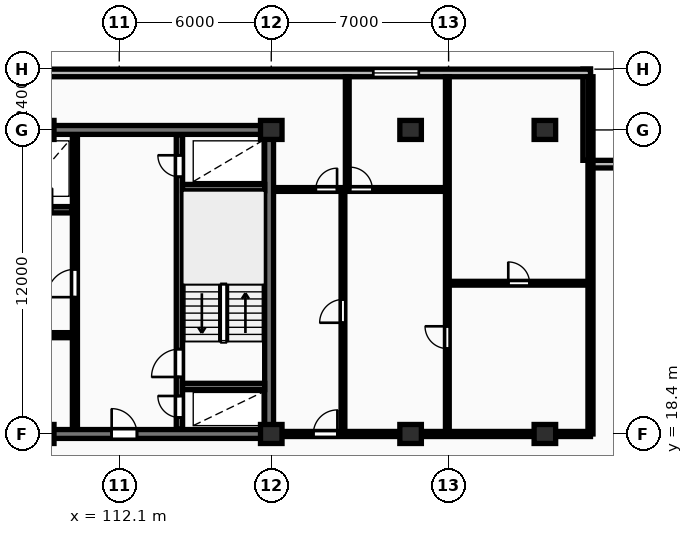
"""IFC4 building model, lengths in metres.
Left out: names, types, materials, properties, quantities, classifications, styles, units other than length and angle.
Written with IfcOpenShell. Run it as: python <this file> out.ifc"""

import sys

from ifc_helpers import new_model, si_unit, direction, frame, frame_2d, origin, origin_2d, place, context, subcontext, project, spatial, rectangle, extrude, element, fill, save


model = new_model("IFC4")
c1 = context("Model", 3, precision=1e-05, world=origin(), true_north=direction((0.0, 1.0)))
c2 = subcontext(c1, "Body", "Model", "MODEL_VIEW")
j1 = project(units=[si_unit("LENGTHUNIT", "METRE"), si_unit("PLANEANGLEUNIT", "RADIAN")], contexts=[c1])
p1 = place(None, origin())
s1 = spatial("IfcSite", under=j1, at=p1, CompositionType="ELEMENT")
p2 = place(p1, origin())
s2 = spatial("IfcBuilding", under=s1, at=p2, CompositionType="ELEMENT")
p3 = place(p2, frame((0.0, 0.0, 87.3)))
s3 = spatial("IfcBuildingStorey", under=s2, at=p3, CompositionType="ELEMENT", Elevation=87.3)
for number, where, z_axis, x_axis in (
    (1, (109.1, 18.4, 0.0), (0.0, 0.0, 1.0), (1.0, 0.0, 0.0)),
    (2, (109.1, 30.4, 0.0), (0.0, 0.0, 1.0), (1.0, 0.0, 0.0)),
    (3, (118.1, 18.4, 0.0), (0.0, 0.0, 1.0), (1.0, 0.0, 0.0)),
    (4, (118.1, 30.4, 0.0), (0.0, 0.0, 1.0), (1.0, 0.0, 0.0)),
    (5, (123.6, 18.4, 0.0), (0.0, 0.0, 1.0), (1.0, 0.0, 0.0)),
    (6, (123.6, 30.4, 0.0), (0.0, 0.0, 1.0), (1.0, 0.0, 0.0)),
    (7, (128.9, 18.4, 0.0), (0.0, 0.0, 1.0), (1.0, 0.0, 0.0)),
    (8, (128.9, 30.4, 0.0), (0.0, 0.0, 1.0), (1.0, 0.0, 0.0)),
):
    element("IfcColumn", number, at=place(p3, frame(where, z_axis=z_axis, x_axis=x_axis)), inside=s3, PredefinedType="COLUMN", context=c2, shape_type="SweptSolid", body=[
        extrude(rectangle(XDim=0.85, YDim=0.75, at=origin_2d()), origin(), (0.0, 0.0, 1.0), 3.25),
    ])
for number, where, z_axis, x_axis in (
    (9, (134.3, 29.05, 0.0), (0.0, 0.0, 1.0), (-1.0, 0.0, 0.0)),
    (10, (130.55, 29.2, 0.0), (0.0, 0.0, 1.0), (0.0, 1.0, 0.0)),
):
    element("IfcWall", number, at=place(p3, frame(where, z_axis=z_axis, x_axis=x_axis)), inside=s3, PredefinedType="STANDARD", context=c2, shape_type="SweptSolid", body=[
        extrude(rectangle(XDim=3.6, YDim=0.3, at=frame_2d((1.8, 0.0))), origin(), (0.0, 0.0, 1.0), 2.97),
    ])
p4 = place(p3, frame((130.7, 32.65, 0.0), z_axis=(0.0, 0.0, 1.0), x_axis=(-1.0, 0.0, 0.0)))
e11 = element("IfcWall", 11, at=p4, inside=s3, PredefinedType="STANDARD", context=c2, shape_type="SweptSolid", body=[
    extrude(rectangle(XDim=58.0, YDim=0.3, at=frame_2d((29.0, 0.0))), origin(), (0.0, 0.0, 1.0), 2.97),
])
p5 = place(p4, frame((50.125, 0.0, 0.85)))
e12 = element("IfcOpeningElement", 12, at=p5, cuts=e11, PredefinedType="OPENING", context=c2, shape_type="SweptSolid", body=[
    extrude(rectangle(XDim=1.8, YDim=1.8, at=frame_2d((0.9, 0.9))), frame((0.0, 0.16, 0.0), z_axis=(0.0, -1.0, 0.0), x_axis=(1.0, 0.0, 0.0)), (0.0, 0.0, 1.0), 0.32),
])
p6 = place(p4, frame((6.775, 0.0, 0.85)))
e13 = element("IfcOpeningElement", 13, at=p6, cuts=e11, PredefinedType="OPENING", context=c2, shape_type="SweptSolid", body=[
    extrude(rectangle(XDim=1.8, YDim=1.8, at=frame_2d((0.9, 0.9))), frame((0.0, 0.16, 0.0), z_axis=(0.0, -1.0, 0.0), x_axis=(1.0, 0.0, 0.0)), (0.0, 0.0, 1.0), 0.32),
])
p7 = place(p3, frame((81.925, 30.4, 0.0), z_axis=(0.0, 0.0, 1.0), x_axis=(1.0, 0.0, 0.0)))
e14 = element("IfcWall", 14, at=p7, inside=s3, PredefinedType="SHEAR", context=c2, shape_type="SweptSolid", body=[
    extrude(rectangle(XDim=36.265, YDim=0.35, at=frame_2d((18.132, 0.0))), origin(), (0.0, 0.0, 1.0), 3.25),
])
p8 = place(p3, frame((118.015, 18.575, 0.0), z_axis=(0.0, 0.0, 1.0), x_axis=(0.0, 1.0, 0.0)))
e15 = element("IfcWall", 15, at=p8, inside=s3, PredefinedType="SHEAR", context=c2, shape_type="SweptSolid", body=[
    extrude(rectangle(XDim=11.65, YDim=0.35, at=frame_2d((5.825, 0.0))), origin(), (0.0, 0.0, 1.0), 3.25),
])
p9 = place(p3, frame((81.925, 18.4, 0.0), z_axis=(0.0, 0.0, 1.0), x_axis=(1.0, 0.0, 0.0)))
e16 = element("IfcWall", 16, at=p9, inside=s3, PredefinedType="SHEAR", context=c2, shape_type="SweptSolid", body=[
    extrude(rectangle(XDim=36.265, YDim=0.35, at=frame_2d((18.132, 0.0))), origin(), (0.0, 0.0, 1.0), 3.25),
])
p10 = place(p9, frame((5.675, 0.0, 0.0)))
e17 = element("IfcOpeningElement", 17, at=p10, cuts=e16, PredefinedType="OPENING", context=c2, shape_type="SweptSolid", body=[
    extrude(rectangle(XDim=1.0, YDim=2.15, at=frame_2d((0.5, 1.075))), frame((0.0, 0.185, 0.0), z_axis=(0.0, -1.0, 0.0), x_axis=(1.0, 0.0, 0.0)), (0.0, 0.0, 1.0), 0.37),
])
p11 = place(p9, frame((21.925, 0.0, 0.0)))
e18 = element("IfcOpeningElement", 18, at=p11, cuts=e16, PredefinedType="OPENING", context=c2, shape_type="SweptSolid", body=[
    extrude(rectangle(XDim=1.5, YDim=2.2, at=frame_2d((0.75, 1.1))), frame((0.0, 0.185, 0.0), z_axis=(0.0, -1.0, 0.0), x_axis=(1.0, 0.0, 0.0)), (0.0, 0.0, 1.0), 0.37),
])
p12 = place(p9, frame((29.875, 0.0, 0.0)))
e19 = element("IfcOpeningElement", 19, at=p12, cuts=e16, PredefinedType="OPENING", context=c2, shape_type="SweptSolid", body=[
    extrude(rectangle(XDim=1.0, YDim=2.15, at=frame_2d((0.5, 1.075))), frame((0.0, 0.185, 0.0), z_axis=(0.0, -1.0, 0.0), x_axis=(1.0, 0.0, 0.0)), (0.0, 0.0, 1.0), 0.37),
])
p13 = place(p3, frame((99.68, 27.25, 0.0), z_axis=(0.0, 0.0, 1.0), x_axis=(1.0, 0.0, 0.0)))
e20 = element("IfcWall", 20, at=p13, inside=s3, PredefinedType="SHEAR", context=c2, shape_type="SweptSolid", body=[
    extrude(rectangle(XDim=10.54, YDim=0.25, at=frame_2d((5.27, 0.0))), origin(), (0.0, 0.0, 1.0), 3.25),
])
p14 = place(p13, frame((8.92, 0.0, 0.0)))
e21 = element("IfcOpeningElement", 21, at=p14, cuts=e20, PredefinedType="OPENING", context=c2, shape_type="SweptSolid", body=[
    extrude(rectangle(XDim=0.85, YDim=2.05, at=frame_2d((0.425, 1.025))), frame((0.0, 0.135, 0.0), z_axis=(0.0, -1.0, 0.0), x_axis=(1.0, 0.0, 0.0)), (0.0, 0.0, 1.0), 0.27),
])
p15 = place(p3, frame((91.08, 22.3, 0.0), z_axis=(0.0, 0.0, 1.0), x_axis=(1.0, 0.0, 0.0)))
e22 = element("IfcWall", 22, at=p15, inside=s3, PredefinedType="PARTITIONING", context=c2, shape_type="SweptSolid", body=[
    extrude(rectangle(XDim=19.14, YDim=0.2, at=frame_2d((9.57, 0.0))), origin(), (0.0, 0.0, 1.0), 2.97),
])
p16 = place(p15, frame((1.15, 0.0, 0.0)))
e23 = element("IfcOpeningElement", 23, at=p16, cuts=e22, PredefinedType="OPENING", context=c2, shape_type="SweptSolid", body=[
    extrude(rectangle(XDim=0.85, YDim=2.05, at=frame_2d((0.425, 1.025))), frame((0.0, 0.11, 0.0), z_axis=(0.0, -1.0, 0.0), x_axis=(1.0, 0.0, 0.0)), (0.0, 0.0, 1.0), 0.22),
])
p17 = place(p15, frame((3.2, 0.0, 0.0)))
e24 = element("IfcOpeningElement", 24, at=p17, cuts=e22, PredefinedType="OPENING", context=c2, shape_type="SweptSolid", body=[
    extrude(rectangle(XDim=0.85, YDim=2.05, at=frame_2d((0.425, 1.025))), frame((0.0, 0.11, 0.0), z_axis=(0.0, -1.0, 0.0), x_axis=(1.0, 0.0, 0.0)), (0.0, 0.0, 1.0), 0.22),
])
p18 = place(p15, frame((12.72, 0.0, 0.0)))
e25 = element("IfcOpeningElement", 25, at=p18, cuts=e22, PredefinedType="OPENING", context=c2, shape_type="SweptSolid", body=[
    extrude(rectangle(XDim=1.5, YDim=2.2, at=frame_2d((0.75, 1.1))), frame((0.0, 0.11, 0.0), z_axis=(0.0, -1.0, 0.0), x_axis=(1.0, 0.0, 0.0)), (0.0, 0.0, 1.0), 0.22),
])
p19 = place(p15, frame((5.52, 0.0, 0.0)))
e26 = element("IfcOpeningElement", 26, at=p19, cuts=e22, PredefinedType="OPENING", context=c2, shape_type="SweptSolid", body=[
    extrude(rectangle(XDim=0.88, YDim=2.06, at=frame_2d((0.44, 1.03))), frame((0.0, 0.11, 0.0), z_axis=(0.0, -1.0, 0.0), x_axis=(1.0, 0.0, 0.0)), (0.0, 0.0, 1.0), 0.22),
])
p20 = place(p15, frame((7.67, 0.0, 0.0)))
e27 = element("IfcOpeningElement", 27, at=p20, cuts=e22, PredefinedType="OPENING", context=c2, shape_type="SweptSolid", body=[
    extrude(rectangle(XDim=0.88, YDim=2.06, at=frame_2d((0.44, 1.03))), frame((0.0, 0.11, 0.0), z_axis=(0.0, -1.0, 0.0), x_axis=(1.0, 0.0, 0.0)), (0.0, 0.0, 1.0), 0.22),
])
p21 = place(p15, frame((10.27, 0.0, 0.0)))
e28 = element("IfcOpeningElement", 28, at=p21, cuts=e22, PredefinedType="OPENING", context=c2, shape_type="SweptSolid", body=[
    extrude(rectangle(XDim=0.85, YDim=2.05, at=frame_2d((0.425, 1.025))), frame((0.0, 0.11, 0.0), z_axis=(0.0, -1.0, 0.0), x_axis=(1.0, 0.0, 0.0)), (0.0, 0.0, 1.0), 0.22),
])
p22 = place(p15, frame((15.92, 0.0, 0.0)))
e29 = element("IfcOpeningElement", 29, at=p22, cuts=e22, PredefinedType="OPENING", context=c2, shape_type="SweptSolid", body=[
    extrude(rectangle(XDim=0.96, YDim=2.1, at=frame_2d((0.48, 1.05))), frame((0.0, 0.11, 0.0), z_axis=(0.0, -1.0, 0.0), x_axis=(1.0, 0.0, 0.0)), (0.0, 0.0, 1.0), 0.22),
])
p23 = place(p3, frame((110.35, 18.6, 0.0), z_axis=(0.0, 0.0, 1.0), x_axis=(0.0, 1.0, 0.0)))
e30 = element("IfcWall", 30, at=p23, inside=s3, PredefinedType="PARTITIONING", context=c2, shape_type="SweptSolid", body=[
    extrude(rectangle(XDim=11.6, YDim=0.2, at=frame_2d((5.8, 0.0))), origin(), (0.0, 0.0, 1.0), 2.97),
])
p24 = place(p23, frame((5.2, 0.0, 0.0)))
e31 = element("IfcOpeningElement", 31, at=p24, cuts=e30, PredefinedType="OPENING", context=c2, shape_type="SweptSolid", body=[
    extrude(rectangle(XDim=1.1, YDim=2.15, at=frame_2d((0.55, 1.075))), frame((0.0, 0.11, 0.0), z_axis=(0.0, -1.0, 0.0), x_axis=(1.0, 0.0, 0.0)), (0.0, 0.0, 1.0), 0.22),
])
p25 = place(p3, frame((114.475, 18.6, 0.0), z_axis=(0.0, 0.0, 1.0), x_axis=(0.0, 1.0, 0.0)))
e32 = element("IfcWall", 32, at=p25, inside=s3, PredefinedType="SHEAR", context=c2, shape_type="SweptSolid", body=[
    extrude(rectangle(XDim=11.6, YDim=0.25, at=frame_2d((5.8, 0.0))), origin(), (0.0, 0.0, 1.0), 3.25),
])
p26 = place(p25, frame((0.45, 0.0, 0.0)))
e33 = element("IfcOpeningElement", 33, at=p26, cuts=e32, PredefinedType="OPENING", context=c2, shape_type="SweptSolid", body=[
    extrude(rectangle(XDim=0.85, YDim=2.05, at=frame_2d((0.425, 1.025))), frame((0.0, 0.135, 0.0), z_axis=(0.0, -1.0, 0.0), x_axis=(1.0, 0.0, 0.0)), (0.0, 0.0, 1.0), 0.27),
])
p27 = place(p25, frame((2.05, 0.0, 0.0)))
e34 = element("IfcOpeningElement", 34, at=p27, cuts=e32, PredefinedType="OPENING", context=c2, shape_type="SweptSolid", body=[
    extrude(rectangle(XDim=1.1, YDim=2.1, at=frame_2d((0.55, 1.05))), frame((0.0, 0.135, 0.0), z_axis=(0.0, -1.0, 0.0), x_axis=(1.0, 0.0, 0.0)), (0.0, 0.0, 1.0), 0.27),
])
p28 = place(p25, frame((9.95, 0.0, 0.0)))
e35 = element("IfcOpeningElement", 35, at=p28, cuts=e32, PredefinedType="OPENING", context=c2, shape_type="SweptSolid", body=[
    extrude(rectangle(XDim=0.85, YDim=2.05, at=frame_2d((0.425, 1.025))), frame((0.0, 0.135, 0.0), z_axis=(0.0, -1.0, 0.0), x_axis=(1.0, 0.0, 0.0)), (0.0, 0.0, 1.0), 0.27),
])
for number, where, z_axis, x_axis in (
    (36, (114.6, 20.275, 0.0), (0.0, 0.0, 1.0), (1.0, 0.0, 0.0)),
    (37, (114.6, 28.125, 0.0), (0.0, 0.0, 1.0), (1.0, 0.0, 0.0)),
):
    element("IfcWall", number, at=place(p3, frame(where, z_axis=z_axis, x_axis=x_axis)), inside=s3, PredefinedType="SHEAR", context=c2, shape_type="SweptSolid", body=[
        extrude(rectangle(XDim=3.24, YDim=0.25, at=frame_2d((1.62, 0.0))), origin(), (0.0, 0.0, 1.0), 3.25),
    ])
p29 = place(p3, frame((130.7, 18.4, 0.0), z_axis=(0.0, 0.0, 1.0), x_axis=(0.0, 1.0, 0.0)))
e38 = element("IfcWall", 38, at=p29, inside=s3, PredefinedType="PARTITIONING", context=c2, shape_type="SweptSolid", body=[
    extrude(rectangle(XDim=14.1, YDim=0.2, at=frame_2d((7.05, 0.0))), origin(), (0.0, 0.0, 1.0), 2.97),
])
p30 = place(p3, frame((125.05, 24.35, 0.0), z_axis=(0.0, 0.0, 1.0), x_axis=(1.0, 0.0, 0.0)))
e39 = element("IfcWall", 39, at=p30, inside=s3, PredefinedType="PARTITIONING", context=c2, shape_type="SweptSolid", body=[
    extrude(rectangle(XDim=5.65, YDim=0.15, at=frame_2d((2.825, 0.0))), origin(), (0.0, 0.0, 1.0), 2.97),
])
p31 = place(p30, frame((2.405, 0.0, 0.0)))
e40 = element("IfcOpeningElement", 40, at=p31, cuts=e39, PredefinedType="OPENING", context=c2, shape_type="SweptSolid", body=[
    extrude(rectangle(XDim=0.84, YDim=2.04, at=frame_2d((0.42, 1.02))), frame((0.0, 0.085, 0.0), z_axis=(0.0, -1.0, 0.0), x_axis=(1.0, 0.0, 0.0)), (0.0, 0.0, 1.0), 0.17),
])
p32 = place(p3, frame((125.05, 18.45, 0.0), z_axis=(0.0, 0.0, 1.0), x_axis=(0.0, 1.0, 0.0)))
e41 = element("IfcWall", 41, at=p32, inside=s3, PredefinedType="PARTITIONING", context=c2, shape_type="SweptSolid", body=[
    extrude(rectangle(XDim=14.05, YDim=0.15, at=frame_2d((7.025, 0.0))), origin(), (0.0, 0.0, 1.0), 2.97),
])
p33 = place(p32, frame((3.32, 0.0, 0.0)))
e42 = element("IfcOpeningElement", 42, at=p33, cuts=e41, PredefinedType="OPENING", context=c2, shape_type="SweptSolid", body=[
    extrude(rectangle(XDim=0.88, YDim=2.06, at=frame_2d((0.44, 1.03))), frame((0.0, 0.085, 0.0), z_axis=(0.0, -1.0, 0.0), x_axis=(1.0, 0.0, 0.0)), (0.0, 0.0, 1.0), 0.17),
])
p34 = place(p3, frame((120.93, 18.45, 0.0), z_axis=(0.0, 0.0, 1.0), x_axis=(0.0, 1.0, 0.0)))
e43 = element("IfcWall", 43, at=p34, inside=s3, PredefinedType="PARTITIONING", context=c2, shape_type="SweptSolid", body=[
    extrude(rectangle(XDim=9.6, YDim=0.15, at=frame_2d((4.8, 0.0))), origin(), (0.0, 0.0, 1.0), 2.97),
])
p35 = place(p34, frame((4.34, 0.0, 0.0)))
e44 = element("IfcOpeningElement", 44, at=p35, cuts=e43, PredefinedType="OPENING", context=c2, shape_type="SweptSolid", body=[
    extrude(rectangle(XDim=0.92, YDim=2.08, at=frame_2d((0.46, 1.04))), frame((0.0, 0.085, 0.0), z_axis=(0.0, -1.0, 0.0), x_axis=(1.0, 0.0, 0.0)), (0.0, 0.0, 1.0), 0.17),
])
p36 = place(p3, frame((121.1, 28.05, 0.0), z_axis=(0.0, 0.0, 1.0), x_axis=(0.0, 1.0, 0.0)))
e45 = element("IfcWall", 45, at=p36, inside=s3, PredefinedType="PARTITIONING", context=c2, shape_type="SweptSolid", body=[
    extrude(rectangle(XDim=4.45, YDim=0.15, at=frame_2d((2.225, 0.0))), origin(), (0.0, 0.0, 1.0), 2.97),
])
p37 = place(p3, frame((118.27, 28.05, 0.0), z_axis=(0.0, 0.0, 1.0), x_axis=(1.0, 0.0, 0.0)))
e46 = element("IfcWall", 46, at=p37, inside=s3, PredefinedType="PARTITIONING", context=c2, shape_type="SweptSolid", body=[
    extrude(rectangle(XDim=6.76, YDim=0.15, at=frame_2d((3.38, 0.0))), origin(), (0.0, 0.0, 1.0), 2.97),
])
p38 = place(p37, frame((1.587, 0.0, 0.0)))
e47 = element("IfcOpeningElement", 47, at=p38, cuts=e46, PredefinedType="OPENING", context=c2, shape_type="SweptSolid", body=[
    extrude(rectangle(XDim=0.84, YDim=2.04, at=frame_2d((0.42, 1.02))), frame((0.0, 0.085, 0.0), z_axis=(0.0, -1.0, 0.0), x_axis=(1.0, 0.0, 0.0)), (0.0, 0.0, 1.0), 0.17),
])
p39 = place(p37, frame((2.94, 0.0, 0.0)))
e48 = element("IfcOpeningElement", 48, at=p39, cuts=e46, PredefinedType="OPENING", context=c2, shape_type="SweptSolid", body=[
    extrude(rectangle(XDim=0.88, YDim=2.06, at=frame_2d((0.44, 1.03))), frame((0.0, 0.085, 0.0), z_axis=(0.0, -1.0, 0.0), x_axis=(1.0, 0.0, 0.0)), (0.0, 0.0, 1.0), 0.17),
])
p40 = place(p3, frame((118.25, 18.4, 0.0), z_axis=(0.0, 0.0, 1.0), x_axis=(1.0, 0.0, 0.0)))
e49 = element("IfcWall", 49, at=p40, inside=s3, PredefinedType="PARTITIONING", context=c2, shape_type="SweptSolid", body=[
    extrude(rectangle(XDim=12.45, YDim=0.2, at=frame_2d((6.225, 0.0))), origin(), (0.0, 0.0, 1.0), 2.358),
])
p41 = place(p40, frame((1.51, 0.0, 0.0)))
e50 = element("IfcOpeningElement", 50, at=p41, cuts=e49, PredefinedType="OPENING", context=c2, shape_type="SweptSolid", body=[
    extrude(rectangle(XDim=0.95, YDim=2.15, at=frame_2d((0.475, 1.075))), frame((0.0, 0.11, 0.0), z_axis=(0.0, -1.0, 0.0), x_axis=(1.0, 0.0, 0.0)), (0.0, 0.0, 1.0), 0.22),
])
p42 = place(p6, origin())
e51 = element("IfcWindow", 51, at=p42, inside=s3, PartitioningType="SINGLE_PANEL", PredefinedType="WINDOW", context=c2, shape_type="SweptSolid", body=[
    extrude(rectangle(XDim=1.8, YDim=1.8, at=frame_2d((0.9, 0.9))), frame((0.0, 0.03, 0.0), z_axis=(0.0, -1.0, 0.0), x_axis=(1.0, 0.0, 0.0)), (0.0, 0.0, 1.0), 0.06),
])
fill(e13, e51)
p43 = place(p12, origin())
e52 = element("IfcDoor", 52, at=p43, inside=s3, OperationType="SINGLE_SWING_LEFT", PredefinedType="DOOR", context=c2, shape_type="SweptSolid", body=[
    extrude(rectangle(XDim=1.0, YDim=2.15, at=frame_2d((0.5, 1.075))), frame((0.0, 0.025, 0.0), z_axis=(0.0, -1.0, 0.0), x_axis=(1.0, 0.0, 0.0)), (0.0, 0.0, 1.0), 0.05),
])
fill(e19, e52)
p44 = place(p24, origin())
e53 = element("IfcDoor", 53, at=p44, inside=s3, OperationType="SINGLE_SWING_LEFT", PredefinedType="DOOR", context=c2, shape_type="SweptSolid", body=[
    extrude(rectangle(XDim=1.1, YDim=2.15, at=frame_2d((0.55, 1.075))), frame((0.0, 0.025, 0.0), z_axis=(0.0, -1.0, 0.0), x_axis=(1.0, 0.0, 0.0)), (0.0, 0.0, 1.0), 0.05),
])
fill(e31, e53)
p45 = place(p26, origin())
e54 = element("IfcDoor", 54, at=p45, inside=s3, OperationType="SINGLE_SWING_RIGHT", PredefinedType="DOOR", context=c2, shape_type="SweptSolid", body=[
    extrude(rectangle(XDim=0.85, YDim=2.05, at=frame_2d((0.425, 1.025))), frame((0.0, 0.025, 0.0), z_axis=(0.0, -1.0, 0.0), x_axis=(1.0, 0.0, 0.0)), (0.0, 0.0, 1.0), 0.05),
])
fill(e33, e54)
p46 = place(p27, origin())
e55 = element("IfcDoor", 55, at=p46, inside=s3, OperationType="SINGLE_SWING_LEFT", PredefinedType="DOOR", context=c2, shape_type="SweptSolid", body=[
    extrude(rectangle(XDim=1.1, YDim=2.1, at=frame_2d((0.55, 1.05))), frame((0.0, 0.025, 0.0), z_axis=(0.0, -1.0, 0.0), x_axis=(1.0, 0.0, 0.0)), (0.0, 0.0, 1.0), 0.05),
])
fill(e34, e55)
p47 = place(p28, origin())
e56 = element("IfcDoor", 56, at=p47, inside=s3, OperationType="SINGLE_SWING_RIGHT", PredefinedType="DOOR", context=c2, shape_type="SweptSolid", body=[
    extrude(rectangle(XDim=0.85, YDim=2.05, at=frame_2d((0.425, 1.025))), frame((0.0, 0.025, 0.0), z_axis=(0.0, -1.0, 0.0), x_axis=(1.0, 0.0, 0.0)), (0.0, 0.0, 1.0), 0.05),
])
fill(e35, e56)
p48 = place(p31, origin())
e57 = element("IfcDoor", 57, at=p48, inside=s3, OperationType="SINGLE_SWING_LEFT", PredefinedType="DOOR", context=c2, shape_type="SweptSolid", body=[
    extrude(rectangle(XDim=0.84, YDim=2.04, at=frame_2d((0.42, 1.02))), frame((0.0, 0.025, 0.0), z_axis=(0.0, -1.0, 0.0), x_axis=(1.0, 0.0, 0.0)), (0.0, 0.0, 1.0), 0.05),
])
fill(e40, e57)
p49 = place(p33, origin())
e58 = element("IfcDoor", 58, at=p49, inside=s3, OperationType="SINGLE_SWING_RIGHT", PredefinedType="DOOR", context=c2, shape_type="SweptSolid", body=[
    extrude(rectangle(XDim=0.88, YDim=2.06, at=frame_2d((0.44, 1.03))), frame((0.0, 0.025, 0.0), z_axis=(0.0, -1.0, 0.0), x_axis=(1.0, 0.0, 0.0)), (0.0, 0.0, 1.0), 0.05),
])
fill(e42, e58)
p50 = place(p35, origin())
e59 = element("IfcDoor", 59, at=p50, inside=s3, OperationType="SINGLE_SWING_LEFT", PredefinedType="DOOR", context=c2, shape_type="SweptSolid", body=[
    extrude(rectangle(XDim=0.92, YDim=2.08, at=frame_2d((0.46, 1.04))), frame((0.0, 0.025, 0.0), z_axis=(0.0, -1.0, 0.0), x_axis=(1.0, 0.0, 0.0)), (0.0, 0.0, 1.0), 0.05),
])
fill(e44, e59)
p51 = place(p38, origin())
e60 = element("IfcDoor", 60, at=p51, inside=s3, OperationType="SINGLE_SWING_RIGHT", PredefinedType="DOOR", context=c2, shape_type="SweptSolid", body=[
    extrude(rectangle(XDim=0.84, YDim=2.04, at=frame_2d((0.42, 1.02))), frame((0.0, 0.025, 0.0), z_axis=(0.0, -1.0, 0.0), x_axis=(1.0, 0.0, 0.0)), (0.0, 0.0, 1.0), 0.05),
])
fill(e47, e60)
p52 = place(p39, origin())
e61 = element("IfcDoor", 61, at=p52, inside=s3, OperationType="SINGLE_SWING_LEFT", PredefinedType="DOOR", context=c2, shape_type="SweptSolid", body=[
    extrude(rectangle(XDim=0.88, YDim=2.06, at=frame_2d((0.44, 1.03))), frame((0.0, 0.025, 0.0), z_axis=(0.0, -1.0, 0.0), x_axis=(1.0, 0.0, 0.0)), (0.0, 0.0, 1.0), 0.05),
])
fill(e48, e61)
p53 = place(p41, origin())
e62 = element("IfcDoor", 62, at=p53, inside=s3, OperationType="SINGLE_SWING_RIGHT", PredefinedType="DOOR", context=c2, shape_type="SweptSolid", body=[
    extrude(rectangle(XDim=0.95, YDim=2.15, at=frame_2d((0.475, 1.075))), frame((0.0, 0.025, 0.0), z_axis=(0.0, -1.0, 0.0), x_axis=(1.0, 0.0, 0.0)), (0.0, 0.0, 1.0), 0.05),
])
fill(e50, e62)
save(model, sys.argv[1])
